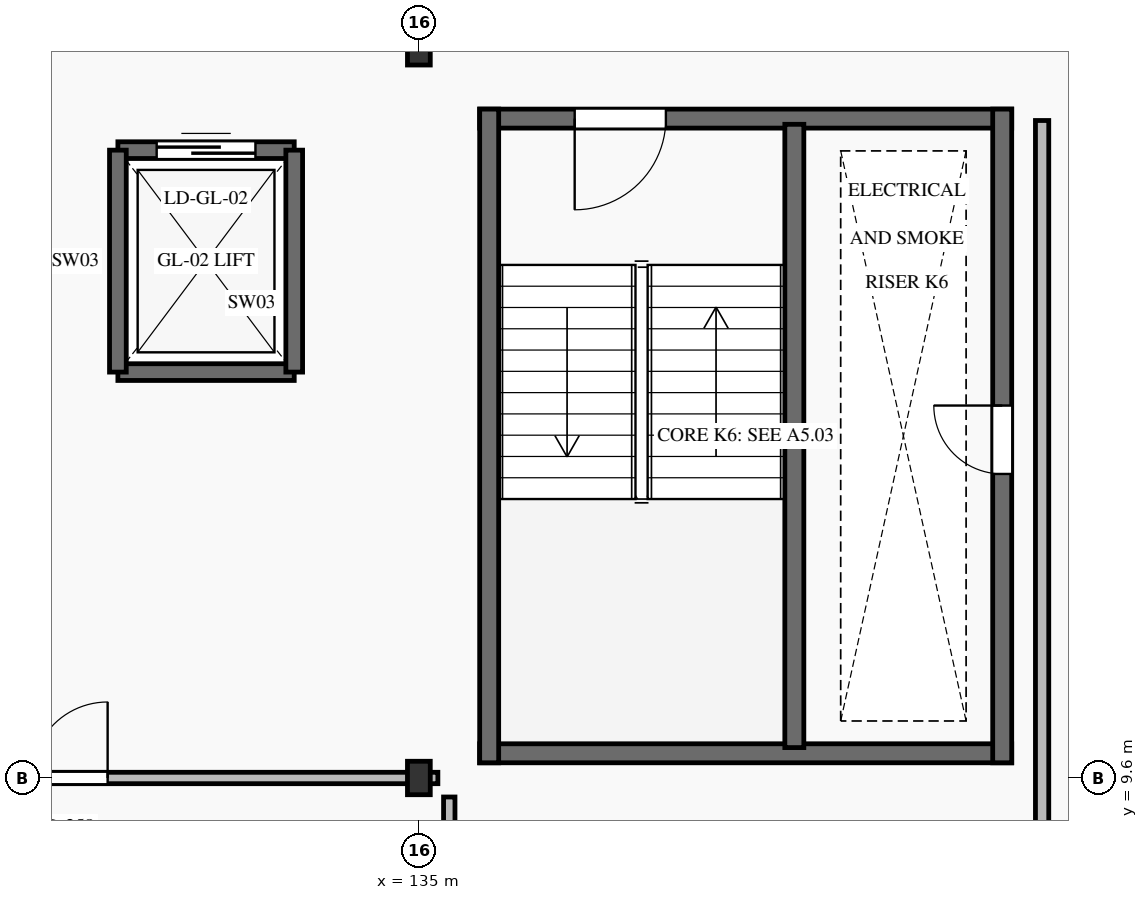
"""IFC4 building model, lengths in metres.
Left out: names, types, materials, properties, quantities, classifications, styles, units other than length and angle.
Written with IfcOpenShell. Run it as: python <this file> out.ifc"""

import sys

from ifc_helpers import new_model, si_unit, direction, frame, frame_2d, origin, origin_2d, place, context, subcontext, project, spatial, rectangle, i_section, extrude, element, fill, save


model = new_model("IFC4")
c1 = context("Model", 3, precision=1e-05, world=origin(), true_north=direction((0.0, 1.0)))
c2 = subcontext(c1, "Body", "Model", "MODEL_VIEW")
j1 = project(units=[si_unit("LENGTHUNIT", "METRE"), si_unit("PLANEANGLEUNIT", "RADIAN")], contexts=[c1])
p1 = place(None, origin())
s1 = spatial("IfcSite", under=j1, at=p1, CompositionType="ELEMENT")
p2 = place(p1, origin())
s2 = spatial("IfcBuilding", under=s1, at=p2, CompositionType="ELEMENT")
p3 = place(p2, frame((0.0, 0.0, 10.8)))
s3 = spatial("IfcBuildingStorey", under=s2, at=p3, CompositionType="ELEMENT", Elevation=10.8)
for number, where, z_axis, x_axis in (
    (1, (135.0, 9.6, 0.0), (0.0, 0.0, 1.0), (1.0, 0.0, 0.0)),
    (2, (135.0, 19.2, 0.0), (0.0, 0.0, 1.0), (1.0, 0.0, 0.0)),
):
    element("IfcColumn", number, at=place(p3, frame(where, z_axis=z_axis, x_axis=x_axis)), inside=s3, PredefinedType="COLUMN", context=c2, shape_type="SweptSolid", body=[
        extrude(i_section(OverallWidth=0.3, OverallDepth=0.44, WebThickness=0.011, FlangeThickness=0.021, FilletRadius=0.027, at=origin_2d()), origin(), (0.0, 0.0, 1.0), 4.2),
    ])
p4 = place(p3, frame((135.8, 9.925, 0.0), z_axis=(0.0, 0.0, 1.0), x_axis=(1.0, 0.0, 0.0)))
e3 = element("IfcWall", 3, at=p4, inside=s3, PredefinedType="SHEAR", context=c2, shape_type="SweptSolid", body=[
    extrude(rectangle(XDim=7.0, YDim=0.25, at=frame_2d((3.5, 0.0))), origin(), (0.0, 0.0, 1.0), 4.2),
])
p5 = place(p3, frame((135.8, 18.275, 0.0), z_axis=(0.0, 0.0, 1.0), x_axis=(1.0, 0.0, 0.0)))
e4 = element("IfcWall", 4, at=p5, inside=s3, PredefinedType="SHEAR", context=c2, shape_type="SweptSolid", body=[
    extrude(rectangle(XDim=7.0, YDim=0.25, at=frame_2d((3.5, 0.0))), origin(), (0.0, 0.0, 1.0), 4.2),
])
p6 = place(p5, frame((1.25, 0.0, 0.0)))
e5 = element("IfcOpeningElement", 5, at=p6, cuts=e4, PredefinedType="OPENING", context=c2, shape_type="SweptSolid", body=[
    extrude(rectangle(XDim=1.2, YDim=2.15, at=frame_2d((0.6, 1.075))), frame((0.0, 0.14, 0.0), z_axis=(0.0, -1.0, 0.0), x_axis=(1.0, 0.0, 0.0)), (0.0, 0.0, 1.0), 0.28),
])
p7 = place(p3, frame((135.925, 9.8, 0.0), z_axis=(0.0, 0.0, 1.0), x_axis=(0.0, 1.0, 0.0)))
e6 = element("IfcWall", 6, at=p7, inside=s3, PredefinedType="SHEAR", context=c2, shape_type="SweptSolid", body=[
    extrude(rectangle(XDim=8.6, YDim=0.25, at=frame_2d((4.3, 0.0))), origin(), (0.0, 0.0, 1.0), 4.2),
])
p8 = place(p3, frame((142.675, 9.8, 0.0), z_axis=(0.0, 0.0, 1.0), x_axis=(0.0, 1.0, 0.0)))
e7 = element("IfcWall", 7, at=p8, inside=s3, PredefinedType="SHEAR", context=c2, shape_type="SweptSolid", body=[
    extrude(rectangle(XDim=8.6, YDim=0.25, at=frame_2d((4.3, 0.0))), origin(), (0.0, 0.0, 1.0), 4.2),
])
p9 = place(p8, frame((3.8, 0.0, 0.0)))
e8 = element("IfcOpeningElement", 8, at=p9, cuts=e7, PredefinedType="OPENING", context=c2, shape_type="SweptSolid", body=[
    extrude(rectangle(XDim=0.9, YDim=2.05, at=frame_2d((0.45, 1.025))), frame((0.0, 0.14, 0.0), z_axis=(0.0, -1.0, 0.0), x_axis=(1.0, 0.0, 0.0)), (0.0, 0.0, 1.0), 0.28),
])
p10 = place(p3, frame((139.94, 10.0, 0.0), z_axis=(0.0, 0.0, 1.0), x_axis=(0.0, 1.0, 0.0)))
e9 = element("IfcWall", 9, at=p10, inside=s3, PredefinedType="SHEAR", context=c2, shape_type="SweptSolid", body=[
    extrude(rectangle(XDim=8.2, YDim=0.25, at=frame_2d((4.1, 0.0))), origin(), (0.0, 0.0, 1.0), 4.2),
])
p11 = place(p3, frame((131.04, 14.94, 0.0), z_axis=(0.0, 0.0, 1.0), x_axis=(1.0, 0.0, 0.0)))
e10 = element("IfcWall", 10, at=p11, inside=s3, PredefinedType="SHEAR", context=c2, shape_type="SweptSolid", body=[
    extrude(rectangle(XDim=2.32, YDim=0.22, at=frame_2d((1.16, 0.0))), origin(), (0.0, 0.0, 1.0), 4.2),
])
p12 = place(p3, frame((131.04, 17.86, 0.0), z_axis=(0.0, 0.0, 1.0), x_axis=(1.0, 0.0, 0.0)))
e11 = element("IfcWall", 11, at=p12, inside=s3, PredefinedType="SHEAR", context=c2, shape_type="SweptSolid", body=[
    extrude(rectangle(XDim=2.32, YDim=0.22, at=frame_2d((1.16, 0.0))), origin(), (0.0, 0.0, 1.0), 4.2),
])
p13 = place(p12, frame((0.51, 0.0, 0.0)))
e12 = element("IfcOpeningElement", 12, at=p13, cuts=e11, PredefinedType="OPENING", context=c2, shape_type="SweptSolid", body=[
    extrude(rectangle(XDim=1.3, YDim=2.25, at=frame_2d((0.65, 1.125))), frame((0.0, 0.125, 0.0), z_axis=(0.0, -1.0, 0.0), x_axis=(1.0, 0.0, 0.0)), (0.0, 0.0, 1.0), 0.25),
])
for number, where, z_axis, x_axis in (
    (13, (131.04, 14.94, 0.0), (0.0, 0.0, 1.0), (0.0, 1.0, 0.0)),
    (14, (133.36, 14.94, 0.0), (0.0, 0.0, 1.0), (0.0, 1.0, 0.0)),
):
    element("IfcWall", number, at=place(p3, frame(where, z_axis=z_axis, x_axis=x_axis)), inside=s3, PredefinedType="SHEAR", context=c2, shape_type="SweptSolid", body=[
        extrude(rectangle(XDim=2.92, YDim=0.22, at=frame_2d((1.46, 0.0))), origin(), (0.0, 0.0, 1.0), 4.2),
    ])
p14 = place(p3, frame((125.56, 9.6, 0.0), z_axis=(0.0, 0.0, 1.0), x_axis=(1.0, 0.0, 0.0)))
e15 = element("IfcWall", 15, at=p14, inside=s3, PredefinedType="PARTITIONING", context=c2, shape_type="SweptSolid", body=[
    extrude(rectangle(XDim=9.69, YDim=0.15, at=frame_2d((4.845, 0.0))), origin(), (0.0, 0.0, 1.0), 3.64),
])
p15 = place(p14, frame((4.345, 0.0, 0.0)))
e16 = element("IfcOpeningElement", 16, at=p15, cuts=e15, PredefinedType="OPENING", context=c2, shape_type="SweptSolid", body=[
    extrude(rectangle(XDim=1.0, YDim=2.15, at=frame_2d((0.5, 1.075))), frame((0.0, 0.09, 0.0), z_axis=(0.0, -1.0, 0.0), x_axis=(1.0, 0.0, 0.0)), (0.0, 0.0, 1.0), 0.18),
])
p16 = place(p3, frame((143.2, 0.385, 0.0), z_axis=(0.0, 0.0, 1.0), x_axis=(0.0, 1.0, 0.0)))
e17 = element("IfcWall", 17, at=p16, inside=s3, PredefinedType="PARTITIONING", context=c2, shape_type="SweptSolid", body=[
    extrude(rectangle(XDim=17.865, YDim=0.175, at=frame_2d((8.933, 0.0))), origin(), (0.0, 0.0, 1.0), 3.94),
])
p17 = place(p16, frame((6.39, 0.0, 0.0)))
e18 = element("IfcOpeningElement", 18, at=p17, cuts=e17, PredefinedType="OPENING", context=c2, shape_type="SweptSolid", body=[
    extrude(rectangle(XDim=1.05, YDim=2.2, at=frame_2d((0.525, 1.1))), frame((0.0, 0.103, 0.0), z_axis=(0.0, -1.0, 0.0), x_axis=(1.0, 0.0, 0.0)), (0.0, 0.0, 1.0), 0.205),
])
p18 = place(p3, frame((135.4, 0.385, 0.0), z_axis=(0.0, 0.0, 1.0), x_axis=(0.0, 1.0, 0.0)))
e19 = element("IfcWall", 19, at=p18, inside=s3, PredefinedType="PARTITIONING", context=c2, shape_type="SweptSolid", body=[
    extrude(rectangle(XDim=8.965, YDim=0.15, at=frame_2d((4.482, 0.0))), origin(), (0.0, 0.0, 1.0), 3.94),
])
p19 = place(p6, frame((1.2, 0.0, 0.0), z_axis=(0.0, 0.0, 1.0), x_axis=(-1.0, 0.0, 0.0)))
e20 = element("IfcDoor", 20, at=p19, inside=s3, OperationType="SINGLE_SWING_LEFT", PredefinedType="DOOR", context=c2, shape_type="SweptSolid", body=[
    extrude(rectangle(XDim=1.2, YDim=2.15, at=frame_2d((0.6, 1.075))), frame((0.0, 0.025, 0.0), z_axis=(0.0, -1.0, 0.0), x_axis=(1.0, 0.0, 0.0)), (0.0, 0.0, 1.0), 0.05),
])
fill(e5, e20)
p20 = place(p9, origin())
e21 = element("IfcDoor", 21, at=p20, inside=s3, OperationType="SINGLE_SWING_RIGHT", PredefinedType="DOOR", context=c2, shape_type="SweptSolid", body=[
    extrude(rectangle(XDim=0.9, YDim=2.05, at=frame_2d((0.45, 1.025))), frame((0.0, 0.025, 0.0), z_axis=(0.0, -1.0, 0.0), x_axis=(1.0, 0.0, 0.0)), (0.0, 0.0, 1.0), 0.05),
])
fill(e8, e21)
p21 = place(p13, origin())
e22 = element("IfcDoor", 22, at=p21, inside=s3, OperationType="SLIDING_TO_LEFT", PredefinedType="DOOR", context=c2, shape_type="SweptSolid", body=[
    extrude(rectangle(XDim=1.3, YDim=2.25, at=frame_2d((0.65, 1.125))), frame((0.0, 0.025, 0.0), z_axis=(0.0, -1.0, 0.0), x_axis=(1.0, 0.0, 0.0)), (0.0, 0.0, 1.0), 0.05),
])
fill(e12, e22)
p22 = place(p15, origin())
e23 = element("IfcDoor", 23, at=p22, inside=s3, OperationType="SINGLE_SWING_RIGHT", PredefinedType="DOOR", context=c2, shape_type="SweptSolid", body=[
    extrude(rectangle(XDim=1.0, YDim=2.15, at=frame_2d((0.5, 1.075))), frame((0.0, 0.025, 0.0), z_axis=(0.0, -1.0, 0.0), x_axis=(1.0, 0.0, 0.0)), (0.0, 0.0, 1.0), 0.05),
])
fill(e16, e23)
save(model, sys.argv[1])
